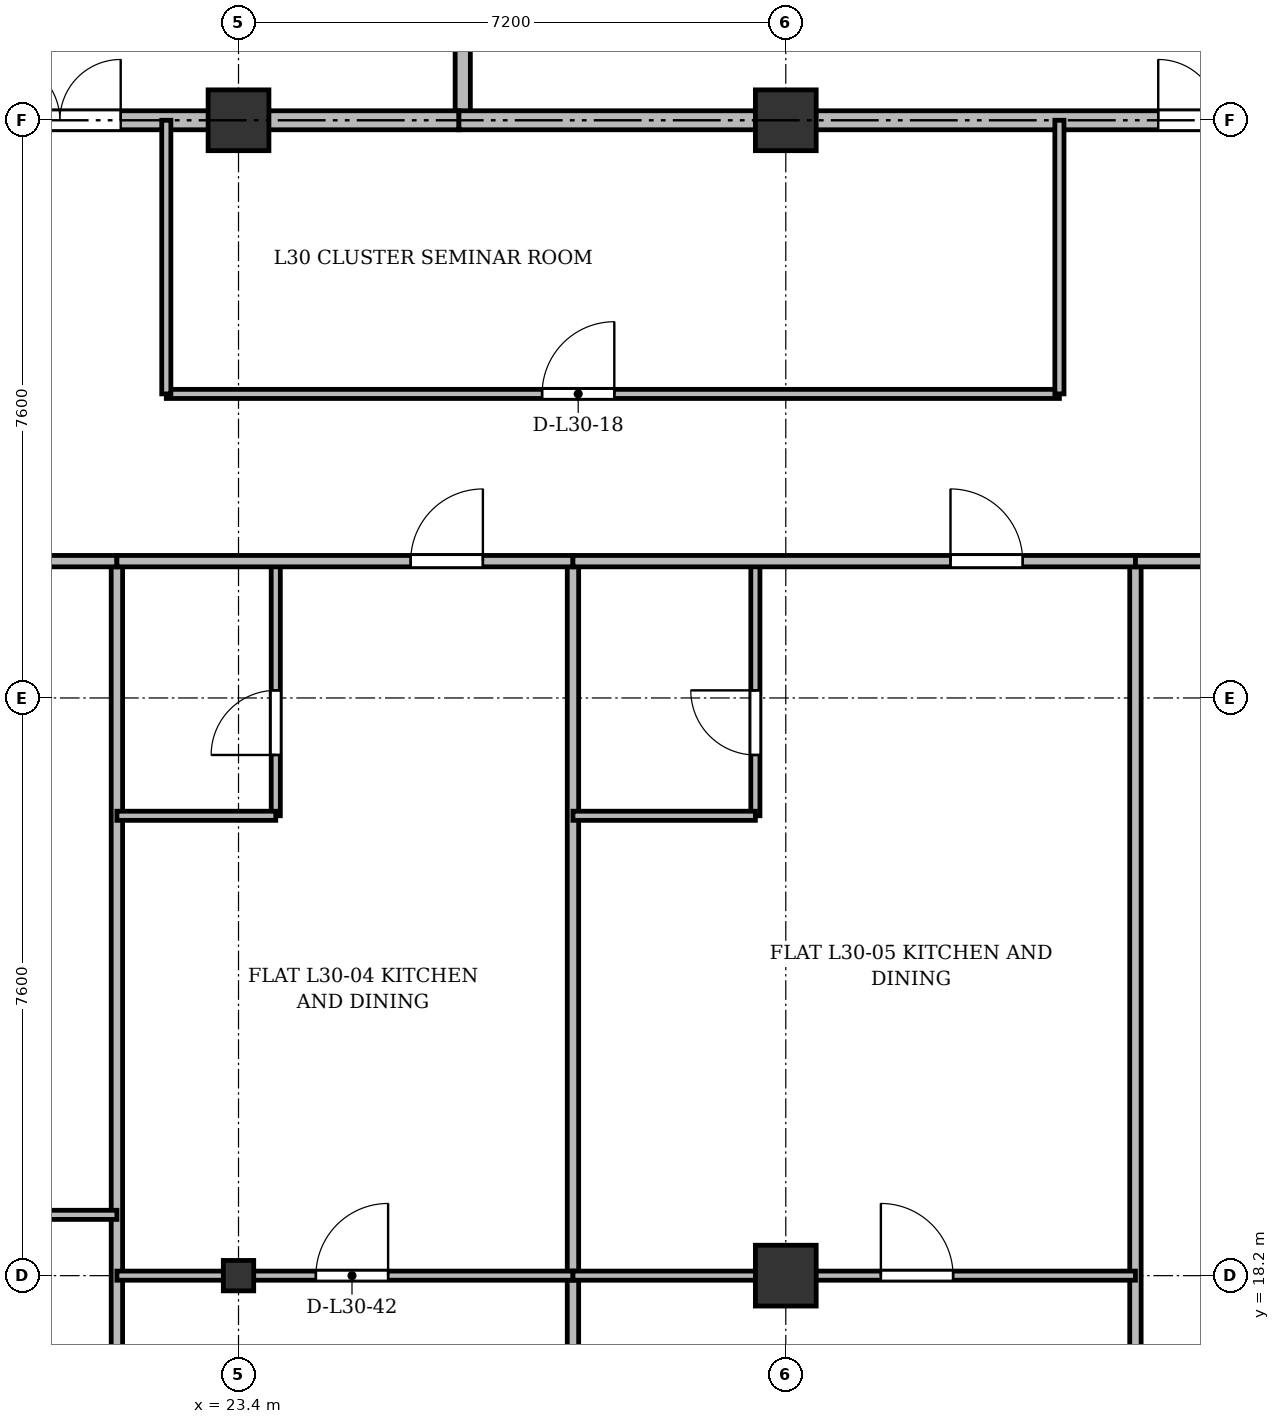
"""IFC4 building model, lengths in metres.
Left out: names, types, materials, properties, quantities, classifications, styles, units other than length and angle.
Written with IfcOpenShell. Run it as: python <this file> out.ifc"""

import sys

from ifc_helpers import new_model, si_unit, direction, frame, frame_2d, origin, origin_2d, place, context, subcontext, project, spatial, rectangle, i_section, extrude, source, transform, mapped, element, fill, save


model = new_model("IFC4")
c1 = context("Model", 3, precision=1e-05, world=origin(), true_north=direction((0.0, 1.0)))
c2 = subcontext(c1, "Body", "Model", "MODEL_VIEW")
j1 = project(units=[si_unit("LENGTHUNIT", "METRE"), si_unit("PLANEANGLEUNIT", "RADIAN")], contexts=[c1])
p1 = place(None, origin())
s1 = spatial("IfcSite", under=j1, at=p1, CompositionType="ELEMENT")
p2 = place(p1, origin())
s2 = spatial("IfcBuilding", under=s1, at=p2, CompositionType="ELEMENT")
p3 = place(p2, frame((0.0, 0.0, 117.7)))
s3 = spatial("IfcBuildingStorey", under=s2, at=p3, CompositionType="ELEMENT", Elevation=117.7)
m1 = source(origin(), c2, "Body", "SweptSolid", [
    extrude(i_section(OverallWidth=0.4, OverallDepth=0.4, WebThickness=0.022, FlangeThickness=0.035, at=origin_2d()), origin(), (0.0, 0.0, 1.0), 3.6),
])
p4 = place(p3, frame((23.4, 18.2, 0.0), z_axis=(0.0, 0.0, 1.0), x_axis=(1.0, 0.0, 0.0)))
e1 = element("IfcColumn", 1, at=p4, inside=s3, PredefinedType="COLUMN", context=c2, shape_type="MappedRepresentation", body=[
    mapped(m1, transform((0.0, 0.0, 0.0), x_axis=(1.0, 0.0, 0.0), y_axis=(0.0, 1.0, 0.0), z_axis=(0.0, 0.0, 1.0), scale=1.0)),
])
m2 = source(origin(), c2, "Body", "SweptSolid", [
    extrude(rectangle(XDim=0.8, YDim=0.8, at=origin_2d()), origin(), (0.0, 0.0, 1.0), 3.6),
])
for number, where, z_axis, x_axis in (
    (2, (23.4, 33.4, 0.0), (0.0, 0.0, 1.0), (1.0, 0.0, 0.0)),
    (3, (30.6, 18.2, 0.0), (0.0, 0.0, 1.0), (1.0, 0.0, 0.0)),
    (4, (30.6, 33.4, 0.0), (0.0, 0.0, 1.0), (1.0, 0.0, 0.0)),
):
    element("IfcColumn", number, at=place(p3, frame(where, z_axis=z_axis, x_axis=x_axis)), inside=s3, PredefinedType="COLUMN", context=c2, shape_type="MappedRepresentation", body=[
        mapped(m2, transform((0.0, 0.0, 0.0), x_axis=(1.0, 0.0, 0.0), y_axis=(0.0, 1.0, 0.0), z_axis=(0.0, 0.0, 1.0), scale=1.0)),
    ])
p5 = place(p3, frame((26.35, 33.4, 0.0), z_axis=(0.0, 0.0, 1.0), x_axis=(0.0, 1.0, 0.0)))
e5 = element("IfcWall", 5, at=p5, inside=s3, PredefinedType="SOLIDWALL", context=c2, shape_type="SweptSolid", body=[
    extrude(rectangle(XDim=11.3, YDim=0.2, at=frame_2d((5.65, 0.0))), origin(), (0.0, 0.0, 1.0), 2.752),
])
p6 = place(p3, frame((19.5, 33.4, 0.0), z_axis=(0.0, 0.0, 1.0), x_axis=(1.0, 0.0, 0.0)))
e6 = element("IfcWall", 6, at=p6, inside=s3, PredefinedType="PARTITIONING", context=c2, shape_type="SweptSolid", body=[
    extrude(rectangle(XDim=6.8, YDim=0.25, at=frame_2d((3.4, 0.0))), origin(), (0.0, 0.0, 1.0), 2.752),
])
p7 = place(p6, frame((0.75, 0.0, 0.0)))
e7 = element("IfcOpeningElement", 7, at=p7, cuts=e6, PredefinedType="OPENING", context=c2, shape_type="SweptSolid", body=[
    extrude(rectangle(XDim=1.6, YDim=2.2, at=frame_2d((0.8, 1.1))), frame((0.0, 0.135, 0.0), z_axis=(0.0, -1.0, 0.0), x_axis=(1.0, 0.0, 0.0)), (0.0, 0.0, 1.0), 0.27),
])
p8 = place(p3, frame((26.3, 33.4, 0.0), z_axis=(0.0, 0.0, 1.0), x_axis=(1.0, 0.0, 0.0)))
e8 = element("IfcWall", 8, at=p8, inside=s3, PredefinedType="PARTITIONING", context=c2, shape_type="SweptSolid", body=[
    extrude(rectangle(XDim=20.85, YDim=0.25, at=frame_2d((10.425, 0.0))), origin(), (0.0, 0.0, 1.0), 2.752),
])
p9 = place(p8, frame((9.2, 0.0, 0.0)))
e9 = element("IfcOpeningElement", 9, at=p9, cuts=e8, PredefinedType="OPENING", context=c2, shape_type="SweptSolid", body=[
    extrude(rectangle(XDim=1.6, YDim=2.2, at=frame_2d((0.8, 1.1))), frame((0.0, 0.135, 0.0), z_axis=(0.0, -1.0, 0.0), x_axis=(1.0, 0.0, 0.0)), (0.0, 0.0, 1.0), 0.27),
])
p10 = place(p3, frame((22.45, 29.8, 0.0), z_axis=(0.0, 0.0, 1.0), x_axis=(1.0, 0.0, 0.0)))
e10 = element("IfcWall", 10, at=p10, inside=s3, PredefinedType="PARTITIONING", context=c2, shape_type="SweptSolid", body=[
    extrude(rectangle(XDim=11.75, YDim=0.12, at=frame_2d((5.875, 0.0))), origin(), (0.0, 0.0, 1.0), 2.84),
])
p11 = place(p10, frame((4.944, 0.0, 0.0)))
e11 = element("IfcOpeningElement", 11, at=p11, cuts=e10, PredefinedType="OPENING", context=c2, shape_type="SweptSolid", body=[
    extrude(rectangle(XDim=0.95, YDim=2.15, at=frame_2d((0.475, 1.075))), frame((0.0, 0.07, 0.0), z_axis=(0.0, -1.0, 0.0), x_axis=(1.0, 0.0, 0.0)), (0.0, 0.0, 1.0), 0.14),
])
for number, where, z_axis, x_axis in (
    (12, (22.45, 29.8, 0.0), (0.0, 0.0, 1.0), (0.0, 1.0, 0.0)),
    (13, (34.2, 29.8, 0.0), (0.0, 0.0, 1.0), (0.0, 1.0, 0.0)),
):
    element("IfcWall", number, at=place(p3, frame(where, z_axis=z_axis, x_axis=x_axis)), inside=s3, PredefinedType="PARTITIONING", context=c2, shape_type="SweptSolid", body=[
        extrude(rectangle(XDim=3.6, YDim=0.12, at=frame_2d((1.8, 0.0))), origin(), (0.0, 0.0, 1.0), 2.752),
    ])
for number, where, z_axis, x_axis in (
    (14, (21.8, 3.145, 0.0), (0.0, 0.0, 1.0), (0.0, 1.0, 0.0)),
    (15, (27.8, 3.145, 0.0), (0.0, 0.0, 1.0), (0.0, 1.0, 0.0)),
    (16, (35.2, 3.145, 0.0), (0.0, 0.0, 1.0), (0.0, 1.0, 0.0)),
):
    element("IfcWall", number, at=place(p3, frame(where, z_axis=z_axis, x_axis=x_axis)), inside=s3, PredefinedType="PARTITIONING", context=c2, shape_type="SweptSolid", body=[
        extrude(rectangle(XDim=24.455, YDim=0.15, at=frame_2d((12.228, 0.0))), origin(), (0.0, 0.0, 1.0), 2.752),
    ])
p12 = place(p3, frame((15.6, 19.0, 0.0), z_axis=(0.0, 0.0, 1.0), x_axis=(1.0, 0.0, 0.0)))
e17 = element("IfcWall", 17, at=p12, inside=s3, PredefinedType="PARTITIONING", context=c2, shape_type="SweptSolid", body=[
    extrude(rectangle(XDim=6.2, YDim=0.12, at=frame_2d((3.1, 0.0))), origin(), (0.0, 0.0, 1.0), 2.84),
])
p13 = place(p12, frame((2.625, 0.0, 0.0)))
e18 = element("IfcOpeningElement", 18, at=p13, cuts=e17, PredefinedType="OPENING", context=c2, shape_type="SweptSolid", body=[
    extrude(rectangle(XDim=0.95, YDim=2.15, at=frame_2d((0.475, 1.075))), frame((0.0, 0.07, 0.0), z_axis=(0.0, -1.0, 0.0), x_axis=(1.0, 0.0, 0.0)), (0.0, 0.0, 1.0), 0.14),
])
p14 = place(p3, frame((15.6, 27.6, 0.0), z_axis=(0.0, 0.0, 1.0), x_axis=(1.0, 0.0, 0.0)))
e19 = element("IfcWall", 19, at=p14, inside=s3, PredefinedType="PARTITIONING", context=c2, shape_type="SweptSolid", body=[
    extrude(rectangle(XDim=6.2, YDim=0.15, at=frame_2d((3.1, 0.0))), origin(), (0.0, 0.0, 1.0), 2.84),
])
p15 = place(p14, frame((4.086, 0.0, 0.0)))
e20 = element("IfcOpeningElement", 20, at=p15, cuts=e19, PredefinedType="OPENING", context=c2, shape_type="SweptSolid", body=[
    extrude(rectangle(XDim=0.95, YDim=2.15, at=frame_2d((0.475, 1.075))), frame((0.0, 0.085, 0.0), z_axis=(0.0, -1.0, 0.0), x_axis=(1.0, 0.0, 0.0)), (0.0, 0.0, 1.0), 0.17),
])
p16 = place(p3, frame((21.8, 18.2, 0.0), z_axis=(0.0, 0.0, 1.0), x_axis=(1.0, 0.0, 0.0)))
e21 = element("IfcWall", 21, at=p16, inside=s3, PredefinedType="PARTITIONING", context=c2, shape_type="SweptSolid", body=[
    extrude(rectangle(XDim=6.0, YDim=0.12, at=frame_2d((3.0, 0.0))), origin(), (0.0, 0.0, 1.0), 2.752),
])
p17 = place(p16, frame((2.618, 0.0, 0.0)))
e22 = element("IfcOpeningElement", 22, at=p17, cuts=e21, PredefinedType="OPENING", context=c2, shape_type="SweptSolid", body=[
    extrude(rectangle(XDim=0.95, YDim=2.15, at=frame_2d((0.475, 1.075))), frame((0.0, 0.07, 0.0), z_axis=(0.0, -1.0, 0.0), x_axis=(1.0, 0.0, 0.0)), (0.0, 0.0, 1.0), 0.14),
])
p18 = place(p3, frame((23.89, 24.25, 0.0), z_axis=(0.0, 0.0, 1.0), x_axis=(0.0, 1.0, 0.0)))
e23 = element("IfcWall", 23, at=p18, inside=s3, PredefinedType="PARTITIONING", context=c2, shape_type="SweptSolid", body=[
    extrude(rectangle(XDim=3.35, YDim=0.12, at=frame_2d((1.675, 0.0))), origin(), (0.0, 0.0, 1.0), 2.99),
])
p19 = place(p18, frame((0.8, 0.0, 0.0)))
e24 = element("IfcOpeningElement", 24, at=p19, cuts=e23, PredefinedType="OPENING", context=c2, shape_type="SweptSolid", body=[
    extrude(rectangle(XDim=0.85, YDim=2.1, at=frame_2d((0.425, 1.05))), frame((0.0, 0.07, 0.0), z_axis=(0.0, -1.0, 0.0), x_axis=(1.0, 0.0, 0.0)), (0.0, 0.0, 1.0), 0.14),
])
p20 = place(p3, frame((21.8, 24.25, 0.0), z_axis=(0.0, 0.0, 1.0), x_axis=(1.0, 0.0, 0.0)))
e25 = element("IfcWall", 25, at=p20, inside=s3, PredefinedType="PARTITIONING", context=c2, shape_type="SweptSolid", body=[
    extrude(rectangle(XDim=2.09, YDim=0.12, at=frame_2d((1.045, 0.0))), origin(), (0.0, 0.0, 1.0), 2.84),
])
p21 = place(p3, frame((21.8, 27.6, 0.0), z_axis=(0.0, 0.0, 1.0), x_axis=(1.0, 0.0, 0.0)))
e26 = element("IfcWall", 26, at=p21, inside=s3, PredefinedType="PARTITIONING", context=c2, shape_type="SweptSolid", body=[
    extrude(rectangle(XDim=6.0, YDim=0.15, at=frame_2d((3.0, 0.0))), origin(), (0.0, 0.0, 1.0), 2.84),
])
p22 = place(p21, frame((3.865, 0.0, 0.0)))
e27 = element("IfcOpeningElement", 27, at=p22, cuts=e26, PredefinedType="OPENING", context=c2, shape_type="SweptSolid", body=[
    extrude(rectangle(XDim=0.95, YDim=2.15, at=frame_2d((0.475, 1.075))), frame((0.0, 0.085, 0.0), z_axis=(0.0, -1.0, 0.0), x_axis=(1.0, 0.0, 0.0)), (0.0, 0.0, 1.0), 0.17),
])
p23 = place(p3, frame((27.8, 18.2, 0.0), z_axis=(0.0, 0.0, 1.0), x_axis=(1.0, 0.0, 0.0)))
e28 = element("IfcWall", 28, at=p23, inside=s3, PredefinedType="PARTITIONING", context=c2, shape_type="SweptSolid", body=[
    extrude(rectangle(XDim=7.4, YDim=0.12, at=frame_2d((3.7, 0.0))), origin(), (0.0, 0.0, 1.0), 2.752),
])
p24 = place(p23, frame((4.051, 0.0, 0.0)))
e29 = element("IfcOpeningElement", 29, at=p24, cuts=e28, PredefinedType="OPENING", context=c2, shape_type="SweptSolid", body=[
    extrude(rectangle(XDim=0.95, YDim=2.15, at=frame_2d((0.475, 1.075))), frame((0.0, 0.07, 0.0), z_axis=(0.0, -1.0, 0.0), x_axis=(1.0, 0.0, 0.0)), (0.0, 0.0, 1.0), 0.14),
])
p25 = place(p3, frame((30.2, 24.25, 0.0), z_axis=(0.0, 0.0, 1.0), x_axis=(0.0, 1.0, 0.0)))
e30 = element("IfcWall", 30, at=p25, inside=s3, PredefinedType="PARTITIONING", context=c2, shape_type="SweptSolid", body=[
    extrude(rectangle(XDim=3.35, YDim=0.12, at=frame_2d((1.675, 0.0))), origin(), (0.0, 0.0, 1.0), 2.99),
])
p26 = place(p25, frame((0.8, 0.0, 0.0)))
e31 = element("IfcOpeningElement", 31, at=p26, cuts=e30, PredefinedType="OPENING", context=c2, shape_type="SweptSolid", body=[
    extrude(rectangle(XDim=0.85, YDim=2.1, at=frame_2d((0.425, 1.05))), frame((0.0, 0.07, 0.0), z_axis=(0.0, -1.0, 0.0), x_axis=(1.0, 0.0, 0.0)), (0.0, 0.0, 1.0), 0.14),
])
p27 = place(p3, frame((27.8, 24.25, 0.0), z_axis=(0.0, 0.0, 1.0), x_axis=(1.0, 0.0, 0.0)))
e32 = element("IfcWall", 32, at=p27, inside=s3, PredefinedType="PARTITIONING", context=c2, shape_type="SweptSolid", body=[
    extrude(rectangle(XDim=2.4, YDim=0.12, at=frame_2d((1.2, 0.0))), origin(), (0.0, 0.0, 1.0), 3.34),
])
p28 = place(p3, frame((27.8, 27.6, 0.0), z_axis=(0.0, 0.0, 1.0), x_axis=(1.0, 0.0, 0.0)))
e33 = element("IfcWall", 33, at=p28, inside=s3, PredefinedType="PARTITIONING", context=c2, shape_type="SweptSolid", body=[
    extrude(rectangle(XDim=7.4, YDim=0.15, at=frame_2d((3.7, 0.0))), origin(), (0.0, 0.0, 1.0), 2.84),
])
p29 = place(p28, frame((4.967, 0.0, 0.0)))
e34 = element("IfcOpeningElement", 34, at=p29, cuts=e33, PredefinedType="OPENING", context=c2, shape_type="SweptSolid", body=[
    extrude(rectangle(XDim=0.95, YDim=2.15, at=frame_2d((0.475, 1.075))), frame((0.0, 0.085, 0.0), z_axis=(0.0, -1.0, 0.0), x_axis=(1.0, 0.0, 0.0)), (0.0, 0.0, 1.0), 0.17),
])
p30 = place(p3, frame((35.2, 27.6, 0.0), z_axis=(0.0, 0.0, 1.0), x_axis=(1.0, 0.0, 0.0)))
e35 = element("IfcWall", 35, at=p30, inside=s3, PredefinedType="PARTITIONING", context=c2, shape_type="SweptSolid", body=[
    extrude(rectangle(XDim=8.6, YDim=0.15, at=frame_2d((4.3, 0.0))), origin(), (0.0, 0.0, 1.0), 2.84),
])
p31 = place(p30, frame((3.825, 0.0, 0.0)))
e36 = element("IfcOpeningElement", 36, at=p31, cuts=e35, PredefinedType="OPENING", context=c2, shape_type="SweptSolid", body=[
    extrude(rectangle(XDim=0.95, YDim=2.15, at=frame_2d((0.475, 1.075))), frame((0.0, 0.085, 0.0), z_axis=(0.0, -1.0, 0.0), x_axis=(1.0, 0.0, 0.0)), (0.0, 0.0, 1.0), 0.17),
])
m3 = source(origin(), c2, "Body", "SweptSolid", [
    extrude(rectangle(XDim=1.6, YDim=2.2, at=frame_2d((0.8, 1.1))), frame((0.0, 0.025, 0.0), z_axis=(0.0, -1.0, 0.0), x_axis=(1.0, 0.0, 0.0)), (0.0, 0.0, 1.0), 0.05),
])
p32 = place(p7, origin())
e37 = element("IfcDoor", 37, at=p32, inside=s3, OperationType="DOUBLE_DOOR_SINGLE_SWING", PredefinedType="DOOR", context=c2, shape_type="MappedRepresentation", body=[
    mapped(m3, transform((0.0, 0.0, 0.0), x_axis=(1.0, 0.0, 0.0), y_axis=(0.0, 1.0, 0.0), z_axis=(0.0, 0.0, 1.0), scale=1.0)),
])
fill(e7, e37)
p33 = place(p9, origin())
e38 = element("IfcDoor", 38, at=p33, inside=s3, OperationType="DOUBLE_DOOR_SINGLE_SWING", PredefinedType="DOOR", context=c2, shape_type="MappedRepresentation", body=[
    mapped(m3, transform((0.0, 0.0, 0.0), x_axis=(1.0, 0.0, 0.0), y_axis=(0.0, 1.0, 0.0), z_axis=(0.0, 0.0, 1.0), scale=1.0)),
])
fill(e9, e38)
m4 = source(origin(), c2, "Body", "SweptSolid", [
    extrude(rectangle(XDim=0.95, YDim=2.15, at=frame_2d((0.475, 1.075))), frame((0.0, 0.025, 0.0), z_axis=(0.0, -1.0, 0.0), x_axis=(1.0, 0.0, 0.0)), (0.0, 0.0, 1.0), 0.05),
])
p34 = place(p11, origin())
e39 = element("IfcDoor", 39, at=p34, inside=s3, OperationType="SINGLE_SWING_RIGHT", PredefinedType="DOOR", context=c2, shape_type="MappedRepresentation", body=[
    mapped(m4, transform((0.0, 0.0, 0.0), x_axis=(1.0, 0.0, 0.0), y_axis=(0.0, 1.0, 0.0), z_axis=(0.0, 0.0, 1.0), scale=1.0)),
])
fill(e11, e39)
p35 = place(p17, origin())
e40 = element("IfcDoor", 40, at=p35, inside=s3, OperationType="SINGLE_SWING_RIGHT", PredefinedType="DOOR", context=c2, shape_type="MappedRepresentation", body=[
    mapped(m4, transform((0.0, 0.0, 0.0), x_axis=(1.0, 0.0, 0.0), y_axis=(0.0, 1.0, 0.0), z_axis=(0.0, 0.0, 1.0), scale=1.0)),
])
fill(e22, e40)
m5 = source(origin(), c2, "Body", "SweptSolid", [
    extrude(rectangle(XDim=0.85, YDim=2.1, at=frame_2d((0.425, 1.05))), frame((0.0, 0.025, 0.0), z_axis=(0.0, -1.0, 0.0), x_axis=(1.0, 0.0, 0.0)), (0.0, 0.0, 1.0), 0.05),
])
p36 = place(p19, origin())
e41 = element("IfcDoor", 41, at=p36, inside=s3, OperationType="SINGLE_SWING_LEFT", PredefinedType="DOOR", context=c2, shape_type="MappedRepresentation", body=[
    mapped(m5, transform((0.0, 0.0, 0.0), x_axis=(1.0, 0.0, 0.0), y_axis=(0.0, 1.0, 0.0), z_axis=(0.0, 0.0, 1.0), scale=1.0)),
])
fill(e24, e41)
p37 = place(p22, origin())
e42 = element("IfcDoor", 42, at=p37, inside=s3, OperationType="SINGLE_SWING_RIGHT", PredefinedType="DOOR", context=c2, shape_type="MappedRepresentation", body=[
    mapped(m4, transform((0.0, 0.0, 0.0), x_axis=(1.0, 0.0, 0.0), y_axis=(0.0, 1.0, 0.0), z_axis=(0.0, 0.0, 1.0), scale=1.0)),
])
fill(e27, e42)
p38 = place(p24, origin())
e43 = element("IfcDoor", 43, at=p38, inside=s3, OperationType="SINGLE_SWING_LEFT", PredefinedType="DOOR", context=c2, shape_type="MappedRepresentation", body=[
    mapped(m4, transform((0.0, 0.0, 0.0), x_axis=(1.0, 0.0, 0.0), y_axis=(0.0, 1.0, 0.0), z_axis=(0.0, 0.0, 1.0), scale=1.0)),
])
fill(e29, e43)
p39 = place(p26, origin())
e44 = element("IfcDoor", 44, at=p39, inside=s3, OperationType="SINGLE_SWING_RIGHT", PredefinedType="DOOR", context=c2, shape_type="MappedRepresentation", body=[
    mapped(m5, transform((0.0, 0.0, 0.0), x_axis=(1.0, 0.0, 0.0), y_axis=(0.0, 1.0, 0.0), z_axis=(0.0, 0.0, 1.0), scale=1.0)),
])
fill(e31, e44)
p40 = place(p29, origin())
e45 = element("IfcDoor", 45, at=p40, inside=s3, OperationType="SINGLE_SWING_LEFT", PredefinedType="DOOR", context=c2, shape_type="MappedRepresentation", body=[
    mapped(m4, transform((0.0, 0.0, 0.0), x_axis=(1.0, 0.0, 0.0), y_axis=(0.0, 1.0, 0.0), z_axis=(0.0, 0.0, 1.0), scale=1.0)),
])
fill(e34, e45)
save(model, sys.argv[1])
